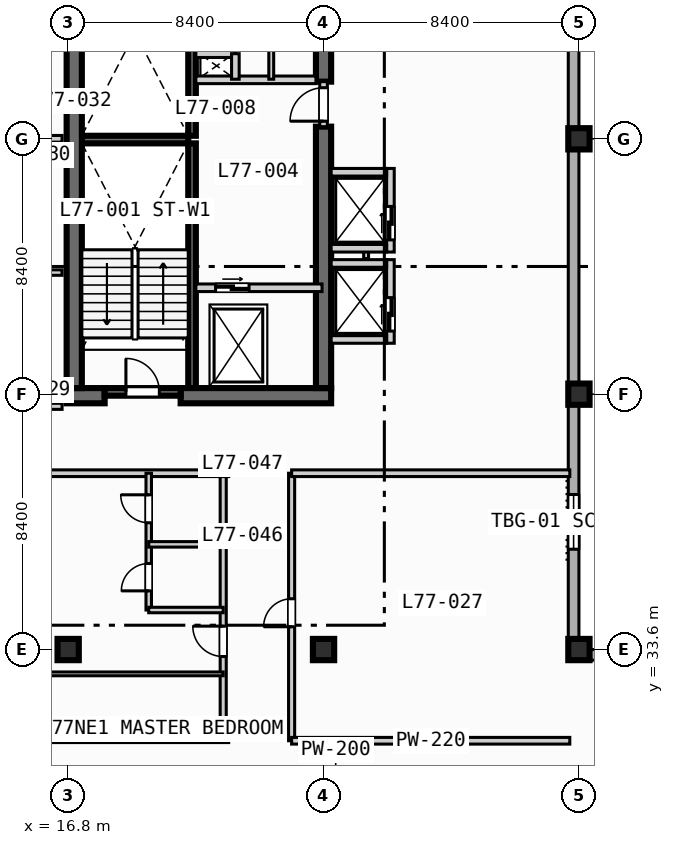
"""IFC4 building model, lengths in metres.
Left out: names, types, materials, properties, quantities, classifications, styles, units other than length and angle.
Written with IfcOpenShell. Run it as: python <this file> out.ifc"""

import sys

from ifc_helpers import new_model, si_unit, direction, frame, frame_2d, origin, origin_2d, place, context, subcontext, project, spatial, rectangle, extrude, element, fill, save


model = new_model("IFC4")
c1 = context("Model", 3, precision=1e-05, world=origin(), true_north=direction((0.0, 1.0)))
c2 = subcontext(c1, "Body", "Model", "MODEL_VIEW")
j1 = project(units=[si_unit("LENGTHUNIT", "METRE"), si_unit("PLANEANGLEUNIT", "RADIAN")], contexts=[c1])
p1 = place(None, origin())
s1 = spatial("IfcSite", under=j1, at=p1, CompositionType="ELEMENT")
p2 = place(p1, origin())
s2 = spatial("IfcBuilding", under=s1, at=p2, CompositionType="ELEMENT")
p3 = place(p2, frame((0.0, 0.0, 312.5)))
s3 = spatial("IfcBuildingStorey", under=s2, at=p3, CompositionType="ELEMENT", Elevation=312.5)
for number, where, z_axis, x_axis in (
    (1, (20.875, 42.2, 0.0), (0.0, 0.0, 1.0), (0.0, 1.0, 0.0)),
    (2, (20.875, 50.5, 0.0), (0.0, 0.0, 1.0), (0.0, 1.0, 0.0)),
):
    element("IfcWall", number, at=place(p3, frame(where, z_axis=z_axis, x_axis=x_axis)), inside=s3, PredefinedType="SOLIDWALL", context=c2, shape_type="SweptSolid", body=[
        extrude(rectangle(XDim=8.05, YDim=0.25, at=frame_2d((4.025, 0.0))), origin(), (0.0, 0.0, 1.0), 3.67),
    ])
p4 = place(p3, frame((17.25, 50.375, 0.0), z_axis=(0.0, 0.0, 1.0), x_axis=(1.0, 0.0, 0.0)))
e3 = element("IfcWall", 3, at=p4, inside=s3, PredefinedType="SOLIDWALL", context=c2, shape_type="SweptSolid", body=[
    extrude(rectangle(XDim=3.5, YDim=0.25, at=frame_2d((1.75, 0.0))), origin(), (0.0, 0.0, 1.0), 3.67),
])
p5 = place(p3, frame((16.75, 41.95, 0.0), z_axis=(0.0, 0.0, 1.0), x_axis=(1.0, 0.0, 0.0)))
e4 = element("IfcWall", 4, at=p5, inside=s3, PredefinedType="SHEAR", context=c2, shape_type="SweptSolid", body=[
    extrude(rectangle(XDim=1.25, YDim=0.5, at=frame_2d((0.625, 0.0))), origin(), (0.0, 0.0, 1.0), 3.67),
])
p6 = place(p3, frame((20.5, 41.95, 0.0), z_axis=(0.0, 0.0, 1.0), x_axis=(1.0, 0.0, 0.0)))
e5 = element("IfcWall", 5, at=p6, inside=s3, PredefinedType="SHEAR", context=c2, shape_type="SweptSolid", body=[
    extrude(rectangle(XDim=4.95, YDim=0.5, at=frame_2d((2.475, 0.0))), origin(), (0.0, 0.0, 1.0), 3.67),
])
p7 = place(p3, frame((17.0, 42.2, 0.0), z_axis=(0.0, 0.0, 1.0), x_axis=(0.0, 1.0, 0.0)))
e6 = element("IfcWall", 6, at=p7, inside=s3, PredefinedType="SHEAR", context=c2, shape_type="SweptSolid", body=[
    extrude(rectangle(XDim=16.35, YDim=0.5, at=frame_2d((8.175, 0.0))), origin(), (0.0, 0.0, 1.0), 3.67),
])
p8 = place(p3, frame((25.2, 42.2, 0.0), z_axis=(0.0, 0.0, 1.0), x_axis=(0.0, 1.0, 0.0)))
e7 = element("IfcWall", 7, at=p8, inside=s3, PredefinedType="SHEAR", context=c2, shape_type="SweptSolid", body=[
    extrude(rectangle(XDim=8.6, YDim=0.5, at=frame_2d((4.3, 0.0))), origin(), (0.0, 0.0, 1.0), 3.67),
])
p9 = place(p3, frame((25.2, 52.28, 0.0), z_axis=(0.0, 0.0, 1.0), x_axis=(0.0, 1.0, 0.0)))
e8 = element("IfcWall", 8, at=p9, inside=s3, PredefinedType="SHEAR", context=c2, shape_type="SweptSolid", body=[
    extrude(rectangle(XDim=1.27, YDim=0.5, at=frame_2d((0.635, 0.0))), origin(), (0.0, 0.0, 1.0), 3.67),
])
for number, where, z_axis, x_axis in (
    (9, (16.8, 33.6, 0.0), (0.0, 0.0, 1.0), (1.0, 0.0, 0.0)),
    (10, (25.2, 33.6, 0.0), (0.0, 0.0, 1.0), (1.0, 0.0, 0.0)),
    (11, (33.6, 33.6, 0.0), (0.0, 0.0, 1.0), (1.0, 0.0, 0.0)),
    (12, (33.6, 42.0, 0.0), (0.0, 0.0, 1.0), (1.0, 0.0, 0.0)),
    (13, (33.6, 50.4, 0.0), (0.0, 0.0, 1.0), (1.0, 0.0, 0.0)),
):
    element("IfcColumn", number, at=place(p3, frame(where, z_axis=z_axis, x_axis=x_axis)), inside=s3, PredefinedType="COLUMN", context=c2, shape_type="SweptSolid", body=[
        extrude(rectangle(XDim=0.7, YDim=0.7, at=origin_2d()), origin(), (0.0, 0.0, 1.0), 3.9),
    ])
p10 = place(p3, frame((33.425, 72.425, 0.0), z_axis=(0.0, 0.0, 1.0), x_axis=(0.0, -1.0, 0.0)))
e14 = element("IfcWall", 14, at=p10, inside=s3, PredefinedType="STANDARD", context=c2, shape_type="SweptSolid", body=[
    extrude(rectangle(XDim=39.0, YDim=0.35, at=frame_2d((19.5, 0.0))), origin(), (0.0, 0.0, 1.0), 3.67),
])
p11 = place(p10, frame((33.725, 0.0, 0.85)))
e15 = element("IfcOpeningElement", 15, at=p11, cuts=e14, PredefinedType="OPENING", context=c2, shape_type="SweptSolid", body=[
    extrude(rectangle(XDim=1.8, YDim=1.8, at=frame_2d((0.9, 0.9))), frame((0.0, 0.185, 0.0), z_axis=(0.0, -1.0, 0.0), x_axis=(1.0, 0.0, 0.0)), (0.0, 0.0, 1.0), 0.37),
])
p12 = place(p10, frame((8.225, 0.0, 0.85)))
e16 = element("IfcOpeningElement", 16, at=p12, cuts=e14, PredefinedType="OPENING", context=c2, shape_type="SweptSolid", body=[
    extrude(rectangle(XDim=2.4, YDim=1.95, at=frame_2d((1.2, 0.975))), frame((0.0, 0.185, 0.0), z_axis=(0.0, -1.0, 0.0), x_axis=(1.0, 0.0, 0.0)), (0.0, 0.0, 1.0), 0.37),
])
p13 = place(p3, frame((33.425, 33.425, 0.0), z_axis=(0.0, 0.0, 1.0), x_axis=(1.0, 0.0, 0.0)))
e17 = element("IfcWall", 17, at=p13, inside=s3, PredefinedType="STANDARD", context=c2, shape_type="SweptSolid", body=[
    extrude(rectangle(XDim=30.6, YDim=0.35, at=frame_2d((15.3, 0.0))), origin(), (0.0, 0.0, 1.0), 3.67),
])
p14 = place(p13, frame((12.075, 0.0, 0.0)))
e18 = element("IfcOpeningElement", 18, at=p14, cuts=e17, PredefinedType="OPENING", context=c2, shape_type="SweptSolid", body=[
    extrude(rectangle(XDim=1.4, YDim=2.2, at=frame_2d((0.7, 1.1))), frame((0.0, 0.185, 0.0), z_axis=(0.0, -1.0, 0.0), x_axis=(1.0, 0.0, 0.0)), (0.0, 0.0, 1.0), 0.37),
])
p15 = place(p3, frame((18.0, 42.075, 0.0), z_axis=(0.0, 0.0, 1.0), x_axis=(1.0, 0.0, 0.0)))
e19 = element("IfcWall", 19, at=p15, inside=s3, PredefinedType="SOLIDWALL", context=c2, shape_type="SweptSolid", body=[
    extrude(rectangle(XDim=2.5, YDim=0.25, at=frame_2d((1.25, 0.0))), origin(), (0.0, 0.0, 1.0), 3.67),
])
p16 = place(p15, frame((0.7, 0.0, 0.0)))
e20 = element("IfcOpeningElement", 20, at=p16, cuts=e19, PredefinedType="OPENING", context=c2, shape_type="SweptSolid", body=[
    extrude(rectangle(XDim=1.1, YDim=2.15, at=frame_2d((0.55, 1.075))), frame((0.0, 0.135, 0.0), z_axis=(0.0, -1.0, 0.0), x_axis=(1.0, 0.0, 0.0)), (0.0, 0.0, 1.0), 0.27),
])
p17 = place(p3, frame((21.0, 45.5, 0.0), z_axis=(0.0, 0.0, 1.0), x_axis=(1.0, 0.0, 0.0)))
e21 = element("IfcWall", 21, at=p17, inside=s3, PredefinedType="SOLIDWALL", context=c2, shape_type="SweptSolid", body=[
    extrude(rectangle(XDim=4.15, YDim=0.25, at=frame_2d((2.075, 0.0))), origin(), (0.0, 0.0, 1.0), 3.67),
])
p18 = place(p17, frame((0.65, 0.0, 0.0)))
e22 = element("IfcOpeningElement", 22, at=p18, cuts=e21, PredefinedType="OPENING", context=c2, shape_type="SweptSolid", body=[
    extrude(rectangle(XDim=1.1, YDim=2.15, at=frame_2d((0.55, 1.075))), frame((0.0, 0.135, 0.0), z_axis=(0.0, -1.0, 0.0), x_axis=(1.0, 0.0, 0.0)), (0.0, 0.0, 1.0), 0.27),
])
p19 = place(p3, frame((25.2, 50.8, 0.0), z_axis=(0.0, 0.0, 1.0), x_axis=(0.0, 1.0, 0.0)))
e23 = element("IfcWall", 23, at=p19, inside=s3, PredefinedType="SOLIDWALL", context=c2, shape_type="SweptSolid", body=[
    extrude(rectangle(XDim=1.48, YDim=0.25, at=frame_2d((0.74, 0.0))), origin(), (0.0, 0.0, 1.0), 3.67),
])
p20 = place(p19, frame((0.18, 0.0, 0.0)))
e24 = element("IfcOpeningElement", 24, at=p20, cuts=e23, PredefinedType="OPENING", context=c2, shape_type="SweptSolid", body=[
    extrude(rectangle(XDim=1.1, YDim=2.15, at=frame_2d((0.55, 1.075))), frame((0.0, 0.135, 0.0), z_axis=(0.0, -1.0, 0.0), x_axis=(1.0, 0.0, 0.0)), (0.0, 0.0, 1.0), 0.27),
])
p21 = place(p3, frame((21.0, 52.34, 0.0), z_axis=(0.0, 0.0, 1.0), x_axis=(1.0, 0.0, 0.0)))
e25 = element("IfcWall", 25, at=p21, inside=s3, PredefinedType="SOLIDWALL", context=c2, shape_type="SweptSolid", body=[
    extrude(rectangle(XDim=3.95, YDim=0.25, at=frame_2d((1.975, 0.0))), origin(), (0.0, 0.0, 1.0), 3.67),
])
p22 = place(p3, frame((21.0, 53.2, 0.0), z_axis=(0.0, 0.0, 1.0), x_axis=(1.0, 0.0, 0.0)))
e26 = element("IfcWall", 26, at=p22, inside=s3, PredefinedType="SOLIDWALL", context=c2, shape_type="SweptSolid", body=[
    extrude(rectangle(XDim=1.3, YDim=0.25, at=frame_2d((0.65, 0.0))), origin(), (0.0, 0.0, 1.0), 3.67),
])
p23 = place(p3, frame((22.3, 52.36, 0.0), z_axis=(0.0, 0.0, 1.0), x_axis=(0.0, 1.0, 0.0)))
e27 = element("IfcWall", 27, at=p23, inside=s3, PredefinedType="SOLIDWALL", context=c2, shape_type="SweptSolid", body=[
    extrude(rectangle(XDim=0.84, YDim=0.25, at=frame_2d((0.42, 0.0))), origin(), (0.0, 0.0, 1.0), 3.67),
])
p24 = place(p3, frame((23.48, 52.36, 0.0), z_axis=(0.0, 0.0, 1.0), x_axis=(0.0, 1.0, 0.0)))
e28 = element("IfcWall", 28, at=p24, inside=s3, PredefinedType="PARTITIONING", context=c2, shape_type="SweptSolid", body=[
    extrude(rectangle(XDim=1.1, YDim=0.16, at=frame_2d((0.55, 0.0))), origin(), (0.0, 0.0, 1.0), 3.67),
])
p25 = place(p3, frame((27.4, 43.675, 0.0), z_axis=(0.0, 0.0, 1.0), x_axis=(0.0, 1.0, 0.0)))
e29 = element("IfcWall", 29, at=p25, inside=s3, PredefinedType="SOLIDWALL", context=c2, shape_type="SweptSolid", body=[
    extrude(rectangle(XDim=2.75, YDim=0.25, at=frame_2d((1.375, 0.0))), origin(), (0.0, 0.0, 1.0), 3.67),
])
p26 = place(p25, frame((0.4, 0.0, 0.0)))
e30 = element("IfcOpeningElement", 30, at=p26, cuts=e29, PredefinedType="OPENING", context=c2, shape_type="SweptSolid", body=[
    extrude(rectangle(XDim=1.1, YDim=2.15, at=frame_2d((0.55, 1.075))), frame((0.0, 0.135, 0.0), z_axis=(0.0, -1.0, 0.0), x_axis=(1.0, 0.0, 0.0)), (0.0, 0.0, 1.0), 0.27),
])
for number, where, z_axis, x_axis in (
    (31, (25.45, 43.8, 0.0), (0.0, 0.0, 1.0), (1.0, 0.0, 0.0)),
    (32, (25.45, 46.3, 0.0), (0.0, 0.0, 1.0), (1.0, 0.0, 0.0)),
):
    element("IfcWall", number, at=place(p3, frame(where, z_axis=z_axis, x_axis=x_axis)), inside=s3, PredefinedType="SOLIDWALL", context=c2, shape_type="SweptSolid", body=[
        extrude(rectangle(XDim=1.825, YDim=0.25, at=frame_2d((0.913, 0.0))), origin(), (0.0, 0.0, 1.0), 3.67),
    ])
p27 = place(p3, frame((26.6, 46.46, 0.0), z_axis=(0.0, 0.0, 1.0), x_axis=(0.0, 1.0, 0.0)))
e33 = element("IfcWall", 33, at=p27, inside=s3, PredefinedType="PARTITIONING", context=c2, shape_type="SweptSolid", body=[
    extrude(rectangle(XDim=0.88, YDim=0.16, at=frame_2d((0.44, 0.0))), origin(), (0.0, 0.0, 1.0), 3.67),
])
p28 = place(p3, frame((27.4, 46.675, 0.0), z_axis=(0.0, 0.0, 1.0), x_axis=(0.0, 1.0, 0.0)))
e34 = element("IfcWall", 34, at=p28, inside=s3, PredefinedType="SOLIDWALL", context=c2, shape_type="SweptSolid", body=[
    extrude(rectangle(XDim=2.75, YDim=0.25, at=frame_2d((1.375, 0.0))), origin(), (0.0, 0.0, 1.0), 3.67),
])
p29 = place(p28, frame((0.4, 0.0, 0.0)))
e35 = element("IfcOpeningElement", 35, at=p29, cuts=e34, PredefinedType="OPENING", context=c2, shape_type="SweptSolid", body=[
    extrude(rectangle(XDim=1.1, YDim=2.15, at=frame_2d((0.55, 1.075))), frame((0.0, 0.135, 0.0), z_axis=(0.0, -1.0, 0.0), x_axis=(1.0, 0.0, 0.0)), (0.0, 0.0, 1.0), 0.27),
])
for number, where, z_axis, x_axis in (
    (36, (25.45, 46.8, 0.0), (0.0, 0.0, 1.0), (1.0, 0.0, 0.0)),
    (37, (25.45, 49.3, 0.0), (0.0, 0.0, 1.0), (1.0, 0.0, 0.0)),
):
    element("IfcWall", number, at=place(p3, frame(where, z_axis=z_axis, x_axis=x_axis)), inside=s3, PredefinedType="SOLIDWALL", context=c2, shape_type="SweptSolid", body=[
        extrude(rectangle(XDim=1.825, YDim=0.25, at=frame_2d((0.913, 0.0))), origin(), (0.0, 0.0, 1.0), 3.67),
    ])
p30 = place(p3, frame((24.15, 30.6, 0.0), z_axis=(0.0, 0.0, 1.0), x_axis=(0.0, 1.0, 0.0)))
e38 = element("IfcWall", 38, at=p30, inside=s3, PredefinedType="PARTITIONING", context=c2, shape_type="SweptSolid", body=[
    extrude(rectangle(XDim=8.8, YDim=0.2, at=frame_2d((4.4, 0.0))), origin(), (0.0, 0.0, 1.0), 3.67),
])
p31 = place(p30, frame((3.75, 0.0, 0.0)))
e39 = element("IfcOpeningElement", 39, at=p31, cuts=e38, PredefinedType="OPENING", context=c2, shape_type="SweptSolid", body=[
    extrude(rectangle(XDim=0.92, YDim=2.1, at=frame_2d((0.46, 1.05))), frame((0.0, 0.11, 0.0), z_axis=(0.0, -1.0, 0.0), x_axis=(1.0, 0.0, 0.0)), (0.0, 0.0, 1.0), 0.22),
])
for number, where, z_axis, x_axis in (
    (40, (24.15, 30.6, 0.0), (0.0, 0.0, 1.0), (1.0, 0.0, 0.0)),
    (41, (24.15, 39.4, 0.0), (0.0, 0.0, 1.0), (1.0, 0.0, 0.0)),
):
    element("IfcWall", number, at=place(p3, frame(where, z_axis=z_axis, x_axis=x_axis)), inside=s3, PredefinedType="PARTITIONING", context=c2, shape_type="SweptSolid", body=[
        extrude(rectangle(XDim=9.15, YDim=0.22, at=frame_2d((4.575, 0.0))), origin(), (0.0, 0.0, 1.0), 3.67),
    ])
p32 = place(p3, frame((8.65, 41.6, 0.0), z_axis=(0.0, 0.0, 1.0), x_axis=(1.0, 0.0, 0.0)))
e42 = element("IfcWall", 42, at=p32, inside=s3, PredefinedType="PARTITIONING", context=c2, shape_type="SweptSolid", body=[
    extrude(rectangle(XDim=7.95, YDim=0.2, at=frame_2d((3.975, 0.0))), origin(), (0.0, 0.0, 1.0), 3.67),
])
p33 = place(p32, frame((2.0, 0.0, 0.0)))
e43 = element("IfcOpeningElement", 43, at=p33, cuts=e42, PredefinedType="OPENING", context=c2, shape_type="SweptSolid", body=[
    extrude(rectangle(XDim=1.0, YDim=2.15, at=frame_2d((0.5, 1.075))), frame((0.0, 0.11, 0.0), z_axis=(0.0, -1.0, 0.0), x_axis=(1.0, 0.0, 0.0)), (0.0, 0.0, 1.0), 0.22),
])
p34 = place(p3, frame((8.65, 50.4, 0.0), z_axis=(0.0, 0.0, 1.0), x_axis=(1.0, 0.0, 0.0)))
e44 = element("IfcWall", 44, at=p34, inside=s3, PredefinedType="PARTITIONING", context=c2, shape_type="SweptSolid", body=[
    extrude(rectangle(XDim=7.95, YDim=0.22, at=frame_2d((3.975, 0.0))), origin(), (0.0, 0.0, 1.0), 3.07),
])
p35 = place(p3, frame((13.8, 46.0, 0.0), z_axis=(0.0, 0.0, 1.0), x_axis=(1.0, 0.0, 0.0)))
e45 = element("IfcWall", 45, at=p35, inside=s3, PredefinedType="PLUMBINGWALL", context=c2, shape_type="SweptSolid", body=[
    extrude(rectangle(XDim=2.8, YDim=0.18, at=frame_2d((1.4, 0.0))), origin(), (0.0, 0.0, 1.0), 3.67),
])
p36 = place(p3, frame((21.9, 30.65, 0.0), z_axis=(0.0, 0.0, 1.0), x_axis=(0.0, 1.0, 0.0)))
e46 = element("IfcWall", 46, at=p36, inside=s3, PredefinedType="PARTITIONING", context=c2, shape_type="SweptSolid", body=[
    extrude(rectangle(XDim=8.75, YDim=0.2, at=frame_2d((4.375, 0.0))), origin(), (0.0, 0.0, 1.0), 3.67),
])
p37 = place(p36, frame((2.72, 0.0, 0.0)))
e47 = element("IfcOpeningElement", 47, at=p37, cuts=e46, PredefinedType="OPENING", context=c2, shape_type="SweptSolid", body=[
    extrude(rectangle(XDim=1.0, YDim=2.15, at=frame_2d((0.5, 1.075))), frame((0.0, 0.11, 0.0), z_axis=(0.0, -1.0, 0.0), x_axis=(1.0, 0.0, 0.0)), (0.0, 0.0, 1.0), 0.22),
])
for number, where, z_axis, x_axis in (
    (48, (8.6, 30.65, 0.0), (0.0, 0.0, 1.0), (1.0, 0.0, 0.0)),
    (49, (8.6, 39.4, 0.0), (0.0, 0.0, 1.0), (1.0, 0.0, 0.0)),
):
    element("IfcWall", number, at=place(p3, frame(where, z_axis=z_axis, x_axis=x_axis)), inside=s3, PredefinedType="PARTITIONING", context=c2, shape_type="SweptSolid", body=[
        extrude(rectangle(XDim=13.48, YDim=0.22, at=frame_2d((6.74, 0.0))), origin(), (0.0, 0.0, 1.0), 3.67),
    ])
p38 = place(p3, frame((19.45, 34.9, 0.0), z_axis=(0.0, 0.0, 1.0), x_axis=(0.0, 1.0, 0.0)))
e50 = element("IfcWall", 50, at=p38, inside=s3, PredefinedType="PLUMBINGWALL", context=c2, shape_type="SweptSolid", body=[
    extrude(rectangle(XDim=4.5, YDim=0.18, at=frame_2d((2.25, 0.0))), origin(), (0.0, 0.0, 1.0), 3.67),
])
p39 = place(p38, frame((0.63, 0.0, 0.0)))
e51 = element("IfcOpeningElement", 51, at=p39, cuts=e50, PredefinedType="OPENING", context=c2, shape_type="SweptSolid", body=[
    extrude(rectangle(XDim=0.9, YDim=2.1, at=frame_2d((0.45, 1.05))), frame((0.0, 0.1, 0.0), z_axis=(0.0, -1.0, 0.0), x_axis=(1.0, 0.0, 0.0)), (0.0, 0.0, 1.0), 0.2),
])
p40 = place(p38, frame((2.87, 0.0, 0.0)))
e52 = element("IfcOpeningElement", 52, at=p40, cuts=e50, PredefinedType="OPENING", context=c2, shape_type="SweptSolid", body=[
    extrude(rectangle(XDim=0.92, YDim=2.1, at=frame_2d((0.46, 1.05))), frame((0.0, 0.1, 0.0), z_axis=(0.0, -1.0, 0.0), x_axis=(1.0, 0.0, 0.0)), (0.0, 0.0, 1.0), 0.2),
])
for number, where, z_axis, x_axis in (
    (53, (19.45, 34.9, 0.0), (0.0, 0.0, 1.0), (1.0, 0.0, 0.0)),
    (54, (19.45, 37.06, 0.0), (0.0, 0.0, 1.0), (1.0, 0.0, 0.0)),
):
    element("IfcWall", number, at=place(p3, frame(where, z_axis=z_axis, x_axis=x_axis)), inside=s3, PredefinedType="PLUMBINGWALL", context=c2, shape_type="SweptSolid", body=[
        extrude(rectangle(XDim=2.45, YDim=0.18, at=frame_2d((1.225, 0.0))), origin(), (0.0, 0.0, 1.0), 3.67),
    ])
p41 = place(p3, frame((8.75, 32.8, 0.0), z_axis=(0.0, 0.0, 1.0), x_axis=(1.0, 0.0, 0.0)))
e55 = element("IfcWall", 55, at=p41, inside=s3, PredefinedType="PARTITIONING", context=c2, shape_type="SweptSolid", body=[
    extrude(rectangle(XDim=13.15, YDim=0.125, at=frame_2d((6.575, 0.0))), origin(), (0.0, 0.0, 1.0), 3.67),
])
p42 = place(p41, frame((4.89, 0.0, 0.0)))
e56 = element("IfcOpeningElement", 56, at=p42, cuts=e55, PredefinedType="OPENING", context=c2, shape_type="SweptSolid", body=[
    extrude(rectangle(XDim=0.92, YDim=2.1, at=frame_2d((0.46, 1.05))), frame((0.0, 0.073, 0.0), z_axis=(0.0, -1.0, 0.0), x_axis=(1.0, 0.0, 0.0)), (0.0, 0.0, 1.0), 0.145),
])
p43 = place(p11, origin())
e57 = element("IfcWindow", 57, at=p43, inside=s3, PartitioningType="SINGLE_PANEL", PredefinedType="WINDOW", context=c2, shape_type="SweptSolid", body=[
    extrude(rectangle(XDim=1.8, YDim=1.8, at=frame_2d((0.9, 0.9))), frame((0.0, 0.03, 0.0), z_axis=(0.0, -1.0, 0.0), x_axis=(1.0, 0.0, 0.0)), (0.0, 0.0, 1.0), 0.06),
])
fill(e15, e57)
p44 = place(p16, origin())
e58 = element("IfcDoor", 58, at=p44, inside=s3, OperationType="SINGLE_SWING_LEFT", PredefinedType="DOOR", context=c2, shape_type="SweptSolid", body=[
    extrude(rectangle(XDim=1.1, YDim=2.15, at=frame_2d((0.55, 1.075))), frame((0.0, 0.025, 0.0), z_axis=(0.0, -1.0, 0.0), x_axis=(1.0, 0.0, 0.0)), (0.0, 0.0, 1.0), 0.05),
])
fill(e20, e58)
p45 = place(p18, origin())
e59 = element("IfcDoor", 59, at=p45, inside=s3, OperationType="SLIDING_TO_LEFT", PredefinedType="DOOR", context=c2, shape_type="SweptSolid", body=[
    extrude(rectangle(XDim=1.1, YDim=2.15, at=frame_2d((0.55, 1.075))), frame((0.0, 0.025, 0.0), z_axis=(0.0, -1.0, 0.0), x_axis=(1.0, 0.0, 0.0)), (0.0, 0.0, 1.0), 0.05),
])
fill(e22, e59)
p46 = place(p20, origin())
e60 = element("IfcDoor", 60, at=p46, inside=s3, OperationType="SINGLE_SWING_LEFT", PredefinedType="DOOR", context=c2, shape_type="SweptSolid", body=[
    extrude(rectangle(XDim=1.1, YDim=2.15, at=frame_2d((0.55, 1.075))), frame((0.0, 0.025, 0.0), z_axis=(0.0, -1.0, 0.0), x_axis=(1.0, 0.0, 0.0)), (0.0, 0.0, 1.0), 0.05),
])
fill(e24, e60)
p47 = place(p26, origin())
e61 = element("IfcDoor", 61, at=p47, inside=s3, OperationType="SLIDING_TO_LEFT", PredefinedType="DOOR", context=c2, shape_type="SweptSolid", body=[
    extrude(rectangle(XDim=1.1, YDim=2.15, at=frame_2d((0.55, 1.075))), frame((0.0, 0.025, 0.0), z_axis=(0.0, -1.0, 0.0), x_axis=(1.0, 0.0, 0.0)), (0.0, 0.0, 1.0), 0.05),
])
fill(e30, e61)
p48 = place(p29, origin())
e62 = element("IfcDoor", 62, at=p48, inside=s3, OperationType="SLIDING_TO_LEFT", PredefinedType="DOOR", context=c2, shape_type="SweptSolid", body=[
    extrude(rectangle(XDim=1.1, YDim=2.15, at=frame_2d((0.55, 1.075))), frame((0.0, 0.025, 0.0), z_axis=(0.0, -1.0, 0.0), x_axis=(1.0, 0.0, 0.0)), (0.0, 0.0, 1.0), 0.05),
])
fill(e35, e62)
p49 = place(p31, origin())
e63 = element("IfcDoor", 63, at=p49, inside=s3, OperationType="SINGLE_SWING_LEFT", PredefinedType="DOOR", context=c2, shape_type="SweptSolid", body=[
    extrude(rectangle(XDim=0.92, YDim=2.1, at=frame_2d((0.46, 1.05))), frame((0.0, 0.025, 0.0), z_axis=(0.0, -1.0, 0.0), x_axis=(1.0, 0.0, 0.0)), (0.0, 0.0, 1.0), 0.05),
])
fill(e39, e63)
p50 = place(p37, origin())
e64 = element("IfcDoor", 64, at=p50, inside=s3, OperationType="SINGLE_SWING_RIGHT", PredefinedType="DOOR", context=c2, shape_type="SweptSolid", body=[
    extrude(rectangle(XDim=1.0, YDim=2.15, at=frame_2d((0.5, 1.075))), frame((0.0, 0.025, 0.0), z_axis=(0.0, -1.0, 0.0), x_axis=(1.0, 0.0, 0.0)), (0.0, 0.0, 1.0), 0.05),
])
fill(e47, e64)
p51 = place(p39, origin())
e65 = element("IfcDoor", 65, at=p51, inside=s3, OperationType="SINGLE_SWING_LEFT", PredefinedType="DOOR", context=c2, shape_type="SweptSolid", body=[
    extrude(rectangle(XDim=0.9, YDim=2.1, at=frame_2d((0.45, 1.05))), frame((0.0, 0.025, 0.0), z_axis=(0.0, -1.0, 0.0), x_axis=(1.0, 0.0, 0.0)), (0.0, 0.0, 1.0), 0.05),
])
fill(e51, e65)
p52 = place(p40, origin())
e66 = element("IfcDoor", 66, at=p52, inside=s3, OperationType="SINGLE_SWING_RIGHT", PredefinedType="DOOR", context=c2, shape_type="SweptSolid", body=[
    extrude(rectangle(XDim=0.92, YDim=2.1, at=frame_2d((0.46, 1.05))), frame((0.0, 0.025, 0.0), z_axis=(0.0, -1.0, 0.0), x_axis=(1.0, 0.0, 0.0)), (0.0, 0.0, 1.0), 0.05),
])
fill(e52, e66)
save(model, sys.argv[1])
